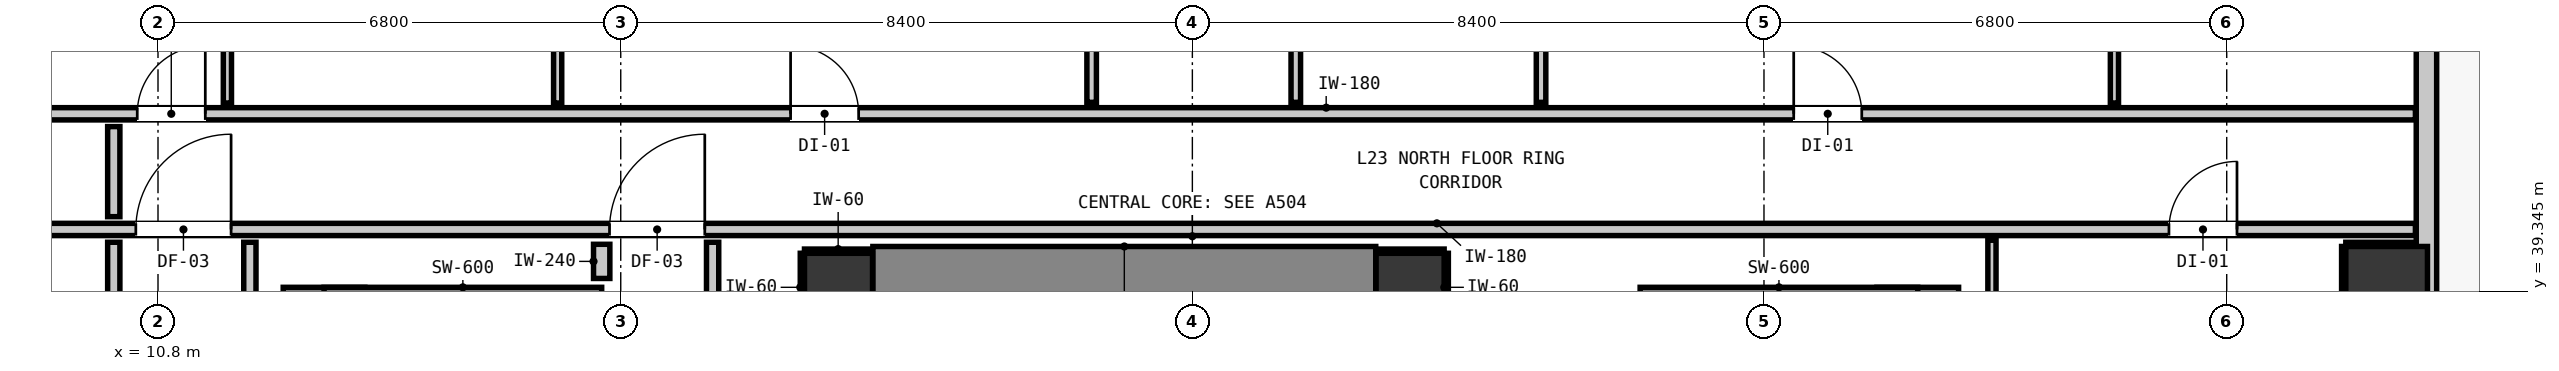
"""IFC4 building model, lengths in metres.
Left out: names, types, materials, properties, quantities, classifications, styles, units other than length and angle.
Written with IfcOpenShell. Run it as: python <this file> out.ifc"""

import sys

from ifc_helpers import new_model, si_unit, direction, frame, frame_2d, origin, origin_2d, place, context, subcontext, project, spatial, rectangle, extrude, element, fill, save


model = new_model("IFC4")
c1 = context("Model", 3, precision=1e-05, world=origin(), true_north=direction((0.0, 1.0)))
c2 = subcontext(c1, "Body", "Model", "MODEL_VIEW")
j1 = project(units=[si_unit("LENGTHUNIT", "METRE"), si_unit("PLANEANGLEUNIT", "RADIAN")], contexts=[c1])
p1 = place(None, origin())
s1 = spatial("IfcSite", under=j1, at=p1, CompositionType="ELEMENT")
p2 = place(p1, origin())
s2 = spatial("IfcBuilding", under=s1, at=p2, CompositionType="ELEMENT")
p3 = place(p2, frame((0.0, 0.0, 81.76)))
s3 = spatial("IfcBuildingStorey", under=s2, at=p3, CompositionType="ELEMENT", Elevation=81.76)
for number, where, z_axis, x_axis in (
    (1, (20.8, 39.4, 0.0), (0.0, 0.0, 1.0), (1.0, 0.0, 0.0)),
    (2, (29.2, 39.4, 0.0), (0.0, 0.0, 1.0), (1.0, 0.0, 0.0)),
):
    element("IfcColumn", number, at=place(p3, frame(where, z_axis=z_axis, x_axis=x_axis)), inside=s3, PredefinedType="COLUMN", context=c2, shape_type="SweptSolid", body=[
        extrude(rectangle(XDim=1.0, YDim=1.0, at=origin_2d()), origin(), (0.0, 0.0, 1.0), 3.32),
    ])
p4 = place(p3, frame((13.24, 31.205, 0.0), z_axis=(0.0, 0.0, 1.0), x_axis=(0.0, 1.0, 0.0)))
e3 = element("IfcWall", 3, at=p4, inside=s3, PredefinedType="SHEAR", context=c2, shape_type="SweptSolid", body=[
    extrude(rectangle(XDim=8.195, YDim=1.2, at=frame_2d((4.097, 0.0))), origin(), (0.0, 0.0, 1.0), 3.32),
])
p5 = place(p3, frame((13.24, 39.1, 0.0), z_axis=(0.0, 0.0, 1.0), x_axis=(1.0, 0.0, 0.0)))
e4 = element("IfcWall", 4, at=p5, inside=s3, PredefinedType="SHEAR", context=c2, shape_type="SweptSolid", body=[
    extrude(rectangle(XDim=4.08, YDim=0.6, at=frame_2d((2.04, 0.0))), origin(), (0.0, 0.0, 1.0), 3.32),
])
p6 = place(p3, frame((36.66, 31.205, 0.0), z_axis=(0.0, 0.0, 1.0), x_axis=(0.0, 1.0, 0.0)))
e5 = element("IfcWall", 5, at=p6, inside=s3, PredefinedType="SHEAR", context=c2, shape_type="SweptSolid", body=[
    extrude(rectangle(XDim=8.195, YDim=1.2, at=frame_2d((4.097, 0.0))), origin(), (0.0, 0.0, 1.0), 3.32),
])
p7 = place(p3, frame((32.58, 39.1, 0.0), z_axis=(0.0, 0.0, 1.0), x_axis=(1.0, 0.0, 0.0)))
e6 = element("IfcWall", 6, at=p7, inside=s3, PredefinedType="SHEAR", context=c2, shape_type="SweptSolid", body=[
    extrude(rectangle(XDim=4.08, YDim=0.6, at=frame_2d((2.04, 0.0))), origin(), (0.0, 0.0, 1.0), 3.32),
])
p8 = place(p3, frame((21.305, 39.4, 0.0), z_axis=(0.0, 0.0, 1.0), x_axis=(1.0, 0.0, 0.0)))
e7 = element("IfcWall", 7, at=p8, inside=s3, PredefinedType="SHEAR", context=c2, shape_type="SweptSolid", body=[
    extrude(rectangle(XDim=7.39, YDim=1.2, at=frame_2d((3.695, 0.0))), origin(), (0.0, 0.0, 1.0), 3.32),
])
p9 = place(p3, frame((43.55, 39.4, -0.2), z_axis=(0.0, 0.0, 1.0), x_axis=(1.0, 0.0, 0.0)))
e8 = element("IfcColumn", 8, at=p9, inside=s3, PredefinedType="COLUMN", context=c2, shape_type="SweptSolid", body=[
    extrude(rectangle(XDim=1.2, YDim=1.2, at=origin_2d()), origin(), (0.0, 0.0, 1.0), 3.52),
])
p10 = place(p3, frame((44.135, 51.035, 0.0), z_axis=(0.0, 0.0, 1.0), x_axis=(0.0, -1.0, 0.0)))
e9 = element("IfcWall", 9, at=p10, inside=s3, PredefinedType="STANDARD", context=c2, shape_type="SweptSolid", body=[
    extrude(rectangle(XDim=34.67, YDim=0.3, at=frame_2d((17.335, 0.0))), origin(), (0.0, 0.0, 1.0), 3.06),
])
p11 = place(p10, frame((0.501, 0.0, 0.0)))
e10 = element("IfcOpeningElement", 10, at=p11, cuts=e9, PredefinedType="OPENING", context=c2, shape_type="SweptSolid", body=[
    extrude(rectangle(XDim=1.1, YDim=2.15, at=frame_2d((0.55, 1.075))), frame((0.0, 0.16, 0.0), z_axis=(0.0, -1.0, 0.0), x_axis=(1.0, 0.0, 0.0)), (0.0, 0.0, 1.0), 0.32),
])
p12 = place(p10, frame((1.978, 0.0, 0.85)))
e11 = element("IfcOpeningElement", 11, at=p12, cuts=e9, PredefinedType="OPENING", context=c2, shape_type="SweptSolid", body=[
    extrude(rectangle(XDim=0.58, YDim=1.5, at=frame_2d((0.29, 0.75))), frame((0.0, 0.16, 0.0), z_axis=(0.0, -1.0, 0.0), x_axis=(1.0, 0.0, 0.0)), (0.0, 0.0, 1.0), 0.32),
])
p13 = place(p10, frame((26.335, 0.0, 0.85)))
e12 = element("IfcOpeningElement", 12, at=p13, cuts=e9, PredefinedType="OPENING", context=c2, shape_type="SweptSolid", body=[
    extrude(rectangle(XDim=1.2, YDim=1.8, at=frame_2d((0.6, 0.9))), frame((0.0, 0.16, 0.0), z_axis=(0.0, -1.0, 0.0), x_axis=(1.0, 0.0, 0.0)), (0.0, 0.0, 1.0), 0.32),
])
p14 = place(p10, frame((13.551, 0.0, 0.85)))
e13 = element("IfcOpeningElement", 13, at=p14, cuts=e9, PredefinedType="OPENING", context=c2, shape_type="SweptSolid", body=[
    extrude(rectangle(XDim=1.2, YDim=1.8, at=frame_2d((0.6, 0.9))), frame((0.0, 0.16, 0.0), z_axis=(0.0, -1.0, 0.0), x_axis=(1.0, 0.0, 0.0)), (0.0, 0.0, 1.0), 0.32),
])
p15 = place(p3, frame((1.827, 40.25, 0.0), z_axis=(0.0, 0.0, 1.0), x_axis=(1.0, 0.0, 0.0)))
e14 = element("IfcWall", 14, at=p15, inside=s3, PredefinedType="PARTITIONING", context=c2, shape_type="SweptSolid", body=[
    extrude(rectangle(XDim=42.146, YDim=0.18, at=frame_2d((21.073, 0.0))), origin(), (0.0, 0.0, 1.0), 3.06),
])
p16 = place(p15, frame((15.608, 0.0, 0.0)))
e15 = element("IfcOpeningElement", 15, at=p16, cuts=e14, PredefinedType="OPENING", context=c2, shape_type="SweptSolid", body=[
    extrude(rectangle(XDim=1.4, YDim=2.15, at=frame_2d((0.7, 1.075))), frame((0.0, 0.1, 0.0), z_axis=(0.0, -1.0, 0.0), x_axis=(1.0, 0.0, 0.0)), (0.0, 0.0, 1.0), 0.2),
])
p17 = place(p15, frame((8.647, 0.0, 0.0)))
e16 = element("IfcOpeningElement", 16, at=p17, cuts=e14, PredefinedType="OPENING", context=c2, shape_type="SweptSolid", body=[
    extrude(rectangle(XDim=1.4, YDim=2.15, at=frame_2d((0.7, 1.075))), frame((0.0, 0.1, 0.0), z_axis=(0.0, -1.0, 0.0), x_axis=(1.0, 0.0, 0.0)), (0.0, 0.0, 1.0), 0.2),
])
p18 = place(p15, frame((38.524, 0.0, 0.0)))
e17 = element("IfcOpeningElement", 17, at=p18, cuts=e14, PredefinedType="OPENING", context=c2, shape_type="SweptSolid", body=[
    extrude(rectangle(XDim=1.0, YDim=2.15, at=frame_2d((0.5, 1.075))), frame((0.0, 0.1, 0.0), z_axis=(0.0, -1.0, 0.0), x_axis=(1.0, 0.0, 0.0)), (0.0, 0.0, 1.0), 0.2),
])
p19 = place(p3, frame((1.827, 41.95, 0.0), z_axis=(0.0, 0.0, 1.0), x_axis=(1.0, 0.0, 0.0)))
e18 = element("IfcWall", 18, at=p19, inside=s3, PredefinedType="PARTITIONING", context=c2, shape_type="SweptSolid", body=[
    extrude(rectangle(XDim=42.146, YDim=0.18, at=frame_2d((21.073, 0.0))), origin(), (0.0, 0.0, 1.0), 3.06),
])
p20 = place(p19, frame((8.668, 0.0, 0.0)))
e19 = element("IfcOpeningElement", 19, at=p20, cuts=e18, PredefinedType="OPENING", context=c2, shape_type="SweptSolid", body=[
    extrude(rectangle(XDim=1.0, YDim=2.15, at=frame_2d((0.5, 1.075))), frame((0.0, 0.1, 0.0), z_axis=(0.0, -1.0, 0.0), x_axis=(1.0, 0.0, 0.0)), (0.0, 0.0, 1.0), 0.2),
])
p21 = place(p19, frame((18.269, 0.0, 0.0)))
e20 = element("IfcOpeningElement", 20, at=p21, cuts=e18, PredefinedType="OPENING", context=c2, shape_type="SweptSolid", body=[
    extrude(rectangle(XDim=1.0, YDim=2.15, at=frame_2d((0.5, 1.075))), frame((0.0, 0.1, 0.0), z_axis=(0.0, -1.0, 0.0), x_axis=(1.0, 0.0, 0.0)), (0.0, 0.0, 1.0), 0.2),
])
p22 = place(p19, frame((33.01, 0.0, 0.0)))
e21 = element("IfcOpeningElement", 21, at=p22, cuts=e18, PredefinedType="OPENING", context=c2, shape_type="SweptSolid", body=[
    extrude(rectangle(XDim=1.0, YDim=2.15, at=frame_2d((0.5, 1.075))), frame((0.0, 0.1, 0.0), z_axis=(0.0, -1.0, 0.0), x_axis=(1.0, 0.0, 0.0)), (0.0, 0.0, 1.0), 0.2),
])
p23 = place(p3, frame((17.32, 39.53, 0.0), z_axis=(0.0, 0.0, 1.0), x_axis=(0.0, 1.0, 0.0)))
e22 = element("IfcWall", 22, at=p23, inside=s3, PredefinedType="PARTITIONING", context=c2, shape_type="SweptSolid", body=[
    extrude(rectangle(XDim=0.502, YDim=0.24, at=frame_2d((0.251, 0.0))), origin(), (0.0, 0.0, 1.0), 3.06),
])
p24 = place(p3, frame((10.15, 37.313, 0.0), z_axis=(0.0, 0.0, 1.0), x_axis=(0.0, 1.0, 0.0)))
e23 = element("IfcWall", 23, at=p24, inside=s3, PredefinedType="PARTITIONING", context=c2, shape_type="SweptSolid", body=[
    extrude(rectangle(XDim=2.749, YDim=0.18, at=frame_2d((1.375, 0.0))), origin(), (0.0, 0.0, 1.0), 3.06),
])
p25 = place(p3, frame((10.15, 40.438, 0.0), z_axis=(0.0, 0.0, 1.0), x_axis=(0.0, 1.0, 0.0)))
e24 = element("IfcWall", 24, at=p25, inside=s3, PredefinedType="PARTITIONING", context=c2, shape_type="SweptSolid", body=[
    extrude(rectangle(XDim=1.324, YDim=0.18, at=frame_2d((0.662, 0.0))), origin(), (0.0, 0.0, 1.0), 3.06),
])
p26 = place(p3, frame((12.15, 21.368, 0.0), z_axis=(0.0, 0.0, 1.0), x_axis=(0.0, 1.0, 0.0)))
e25 = element("IfcWall", 25, at=p26, inside=s3, PredefinedType="PARTITIONING", context=c2, shape_type="SweptSolid", body=[
    extrude(rectangle(XDim=18.694, YDim=0.18, at=frame_2d((9.347, 0.0))), origin(), (0.0, 0.0, 1.0), 3.06),
])
p27 = place(p3, frame((18.95, 38.918, 0.0), z_axis=(0.0, 0.0, 1.0), x_axis=(0.0, 1.0, 0.0)))
e26 = element("IfcWall", 26, at=p27, inside=s3, PredefinedType="PARTITIONING", context=c2, shape_type="SweptSolid", body=[
    extrude(rectangle(XDim=1.144, YDim=0.18, at=frame_2d((0.572, 0.0))), origin(), (0.0, 0.0, 1.0), 3.06),
])
p28 = place(p3, frame((24.52, 42.118, 0.0), z_axis=(0.0, 0.0, 1.0), x_axis=(0.0, 1.0, 0.0)))
e27 = element("IfcWall", 27, at=p28, inside=s3, PredefinedType="PARTITIONING", context=c2, shape_type="SweptSolid", body=[
    extrude(rectangle(XDim=5.934, YDim=0.14, at=frame_2d((2.967, 0.0))), origin(), (0.0, 0.0, 1.0), 3.06),
])
p29 = place(p28, frame((2.507, 0.0, 0.0)))
e28 = element("IfcOpeningElement", 28, at=p29, cuts=e27, PredefinedType="OPENING", context=c2, shape_type="SweptSolid", body=[
    extrude(rectangle(XDim=0.9, YDim=2.1, at=frame_2d((0.45, 1.05))), frame((0.0, 0.08, 0.0), z_axis=(0.0, -1.0, 0.0), x_axis=(1.0, 0.0, 0.0)), (0.0, 0.0, 1.0), 0.16),
])
p30 = place(p3, frame((27.52, 42.118, 0.0), z_axis=(0.0, 0.0, 1.0), x_axis=(0.0, 1.0, 0.0)))
e29 = element("IfcWall", 29, at=p30, inside=s3, PredefinedType="PARTITIONING", context=c2, shape_type="SweptSolid", body=[
    extrude(rectangle(XDim=5.934, YDim=0.14, at=frame_2d((2.967, 0.0))), origin(), (0.0, 0.0, 1.0), 3.06),
])
p31 = place(p3, frame((31.124, 42.118, 0.0), z_axis=(0.0, 0.0, 1.0), x_axis=(0.0, 1.0, 0.0)))
e30 = element("IfcWall", 30, at=p31, inside=s3, PredefinedType="PARTITIONING", context=c2, shape_type="SweptSolid", body=[
    extrude(rectangle(XDim=5.934, YDim=0.14, at=frame_2d((2.967, 0.0))), origin(), (0.0, 0.0, 1.0), 3.06),
])
p32 = place(p31, frame((2.527, 0.0, 0.0)))
e31 = element("IfcOpeningElement", 31, at=p32, cuts=e30, PredefinedType="OPENING", context=c2, shape_type="SweptSolid", body=[
    extrude(rectangle(XDim=0.86, YDim=2.02, at=frame_2d((0.43, 1.01))), frame((0.0, 0.08, 0.0), z_axis=(0.0, -1.0, 0.0), x_axis=(1.0, 0.0, 0.0)), (0.0, 0.0, 1.0), 0.16),
])
p33 = place(p3, frame((11.82, 42.108, 0.0), z_axis=(0.0, 0.0, 1.0), x_axis=(0.0, 1.0, 0.0)))
e32 = element("IfcWall", 32, at=p33, inside=s3, PredefinedType="PARTITIONING", context=c2, shape_type="SweptSolid", body=[
    extrude(rectangle(XDim=5.954, YDim=0.12, at=frame_2d((2.977, 0.0))), origin(), (0.0, 0.0, 1.0), 3.06),
])
p34 = place(p33, frame((2.53, 0.0, 0.0)))
e33 = element("IfcOpeningElement", 33, at=p34, cuts=e32, PredefinedType="OPENING", context=c2, shape_type="SweptSolid", body=[
    extrude(rectangle(XDim=0.9, YDim=2.1, at=frame_2d((0.45, 1.05))), frame((0.0, 0.07, 0.0), z_axis=(0.0, -1.0, 0.0), x_axis=(1.0, 0.0, 0.0)), (0.0, 0.0, 1.0), 0.14),
])
p35 = place(p3, frame((16.673, 42.108, 0.0), z_axis=(0.0, 0.0, 1.0), x_axis=(0.0, 1.0, 0.0)))
e34 = element("IfcWall", 34, at=p35, inside=s3, PredefinedType="PARTITIONING", context=c2, shape_type="SweptSolid", body=[
    extrude(rectangle(XDim=5.954, YDim=0.12, at=frame_2d((2.977, 0.0))), origin(), (0.0, 0.0, 1.0), 3.06),
])
p36 = place(p3, frame((37.75, 35.006, 0.0), z_axis=(0.0, 0.0, 1.0), x_axis=(0.0, 1.0, 0.0)))
e35 = element("IfcWall", 35, at=p36, inside=s3, PredefinedType="PARTITIONING", context=c2, shape_type="SweptSolid", body=[
    extrude(rectangle(XDim=5.086, YDim=0.12, at=frame_2d((2.543, 0.0))), origin(), (0.0, 0.0, 1.0), 3.06),
])
p37 = place(p3, frame((39.55, 42.108, 0.0), z_axis=(0.0, 0.0, 1.0), x_axis=(0.0, 1.0, 0.0)))
e36 = element("IfcWall", 36, at=p37, inside=s3, PredefinedType="PARTITIONING", context=c2, shape_type="SweptSolid", body=[
    extrude(rectangle(XDim=5.954, YDim=0.12, at=frame_2d((2.977, 0.0))), origin(), (0.0, 0.0, 1.0), 2.445),
])
p38 = place(p37, frame((2.517, 0.0, 0.0)))
e37 = element("IfcOpeningElement", 37, at=p38, cuts=e36, PredefinedType="OPENING", context=c2, shape_type="SweptSolid", body=[
    extrude(rectangle(XDim=0.9, YDim=2.1, at=frame_2d((0.45, 1.05))), frame((0.0, 0.07, 0.0), z_axis=(0.0, -1.0, 0.0), x_axis=(1.0, 0.0, 0.0)), (0.0, 0.0, 1.0), 0.14),
])
p39 = place(p3, frame((20.3, 39.932, 0.0), z_axis=(0.0, 0.0, 1.0), x_axis=(1.0, 0.0, 0.0)))
e38 = element("IfcWall", 38, at=p39, inside=s3, PredefinedType="PARTITIONING", context=c2, shape_type="SweptSolid", body=[
    extrude(rectangle(XDim=0.99, YDim=0.06, at=frame_2d((0.495, 0.0))), origin(), (0.0, 0.0, 1.0), 1.45),
])
p40 = place(p3, frame((20.268, 38.9, 0.0), z_axis=(0.0, 0.0, 1.0), x_axis=(0.0, 1.0, 0.0)))
e39 = element("IfcWall", 39, at=p40, inside=s3, PredefinedType="PARTITIONING", context=c2, shape_type="SweptSolid", body=[
    extrude(rectangle(XDim=1.0, YDim=0.06, at=frame_2d((0.5, 0.0))), origin(), (0.0, 0.0, 1.0), 1.45),
])
p41 = place(p3, frame((28.71, 39.932, 0.0), z_axis=(0.0, 0.0, 1.0), x_axis=(1.0, 0.0, 0.0)))
e40 = element("IfcWall", 40, at=p41, inside=s3, PredefinedType="PARTITIONING", context=c2, shape_type="SweptSolid", body=[
    extrude(rectangle(XDim=0.99, YDim=0.06, at=frame_2d((0.495, 0.0))), origin(), (0.0, 0.0, 1.0), 1.45),
])
p42 = place(p3, frame((29.732, 38.9, 0.0), z_axis=(0.0, 0.0, 1.0), x_axis=(0.0, 1.0, 0.0)))
e41 = element("IfcWall", 41, at=p42, inside=s3, PredefinedType="PARTITIONING", context=c2, shape_type="SweptSolid", body=[
    extrude(rectangle(XDim=1.0, YDim=0.06, at=frame_2d((0.5, 0.0))), origin(), (0.0, 0.0, 1.0), 1.45),
])
p43 = place(p3, frame((42.95, 40.032, 0.0), z_axis=(0.0, 0.0, 1.0), x_axis=(1.0, 0.0, 0.0)))
e42 = element("IfcWall", 42, at=p43, inside=s3, PredefinedType="PARTITIONING", context=c2, shape_type="SweptSolid", body=[
    extrude(rectangle(XDim=1.02, YDim=0.06, at=frame_2d((0.51, 0.0))), origin(), (0.0, 0.0, 1.0), 1.45),
])
p44 = place(p3, frame((42.918, 38.8, 0.0), z_axis=(0.0, 0.0, 1.0), x_axis=(0.0, 1.0, 0.0)))
e43 = element("IfcWall", 43, at=p44, inside=s3, PredefinedType="PARTITIONING", context=c2, shape_type="SweptSolid", body=[
    extrude(rectangle(XDim=1.2, YDim=0.06, at=frame_2d((0.6, 0.0))), origin(), (0.0, 0.0, 1.0), 1.45),
])
p45 = place(p16, origin())
e44 = element("IfcDoor", 44, at=p45, inside=s3, OperationType="SINGLE_SWING_RIGHT", PredefinedType="DOOR", context=c2, shape_type="SweptSolid", body=[
    extrude(rectangle(XDim=1.4, YDim=2.15, at=frame_2d((0.7, 1.075))), frame((0.0, 0.025, 0.0), z_axis=(0.0, -1.0, 0.0), x_axis=(1.0, 0.0, 0.0)), (0.0, 0.0, 1.0), 0.05),
])
fill(e15, e44)
p46 = place(p17, origin())
e45 = element("IfcDoor", 45, at=p46, inside=s3, OperationType="SINGLE_SWING_RIGHT", PredefinedType="DOOR", context=c2, shape_type="SweptSolid", body=[
    extrude(rectangle(XDim=1.4, YDim=2.15, at=frame_2d((0.7, 1.075))), frame((0.0, 0.025, 0.0), z_axis=(0.0, -1.0, 0.0), x_axis=(1.0, 0.0, 0.0)), (0.0, 0.0, 1.0), 0.05),
])
fill(e16, e45)
p47 = place(p20, origin())
e46 = element("IfcDoor", 46, at=p47, inside=s3, OperationType="SINGLE_SWING_RIGHT", PredefinedType="DOOR", context=c2, shape_type="SweptSolid", body=[
    extrude(rectangle(XDim=1.0, YDim=2.15, at=frame_2d((0.5, 1.075))), frame((0.0, 0.025, 0.0), z_axis=(0.0, -1.0, 0.0), x_axis=(1.0, 0.0, 0.0)), (0.0, 0.0, 1.0), 0.05),
])
fill(e19, e46)
p48 = place(p21, origin())
e47 = element("IfcDoor", 47, at=p48, inside=s3, OperationType="SINGLE_SWING_LEFT", PredefinedType="DOOR", context=c2, shape_type="SweptSolid", body=[
    extrude(rectangle(XDim=1.0, YDim=2.15, at=frame_2d((0.5, 1.075))), frame((0.0, 0.025, 0.0), z_axis=(0.0, -1.0, 0.0), x_axis=(1.0, 0.0, 0.0)), (0.0, 0.0, 1.0), 0.05),
])
fill(e20, e47)
p49 = place(p22, origin())
e48 = element("IfcDoor", 48, at=p49, inside=s3, OperationType="SINGLE_SWING_LEFT", PredefinedType="DOOR", context=c2, shape_type="SweptSolid", body=[
    extrude(rectangle(XDim=1.0, YDim=2.15, at=frame_2d((0.5, 1.075))), frame((0.0, 0.025, 0.0), z_axis=(0.0, -1.0, 0.0), x_axis=(1.0, 0.0, 0.0)), (0.0, 0.0, 1.0), 0.05),
])
fill(e21, e48)
p50 = place(p18, origin())
e49 = element("IfcDoor", 49, at=p50, inside=s3, OperationType="SINGLE_SWING_RIGHT", PredefinedType="DOOR", context=c2, shape_type="SweptSolid", body=[
    extrude(rectangle(XDim=1.0, YDim=2.15, at=frame_2d((0.5, 1.075))), frame((0.0, 0.025, 0.0), z_axis=(0.0, -1.0, 0.0), x_axis=(1.0, 0.0, 0.0)), (0.0, 0.0, 1.0), 0.05),
])
fill(e17, e49)
save(model, sys.argv[1])
